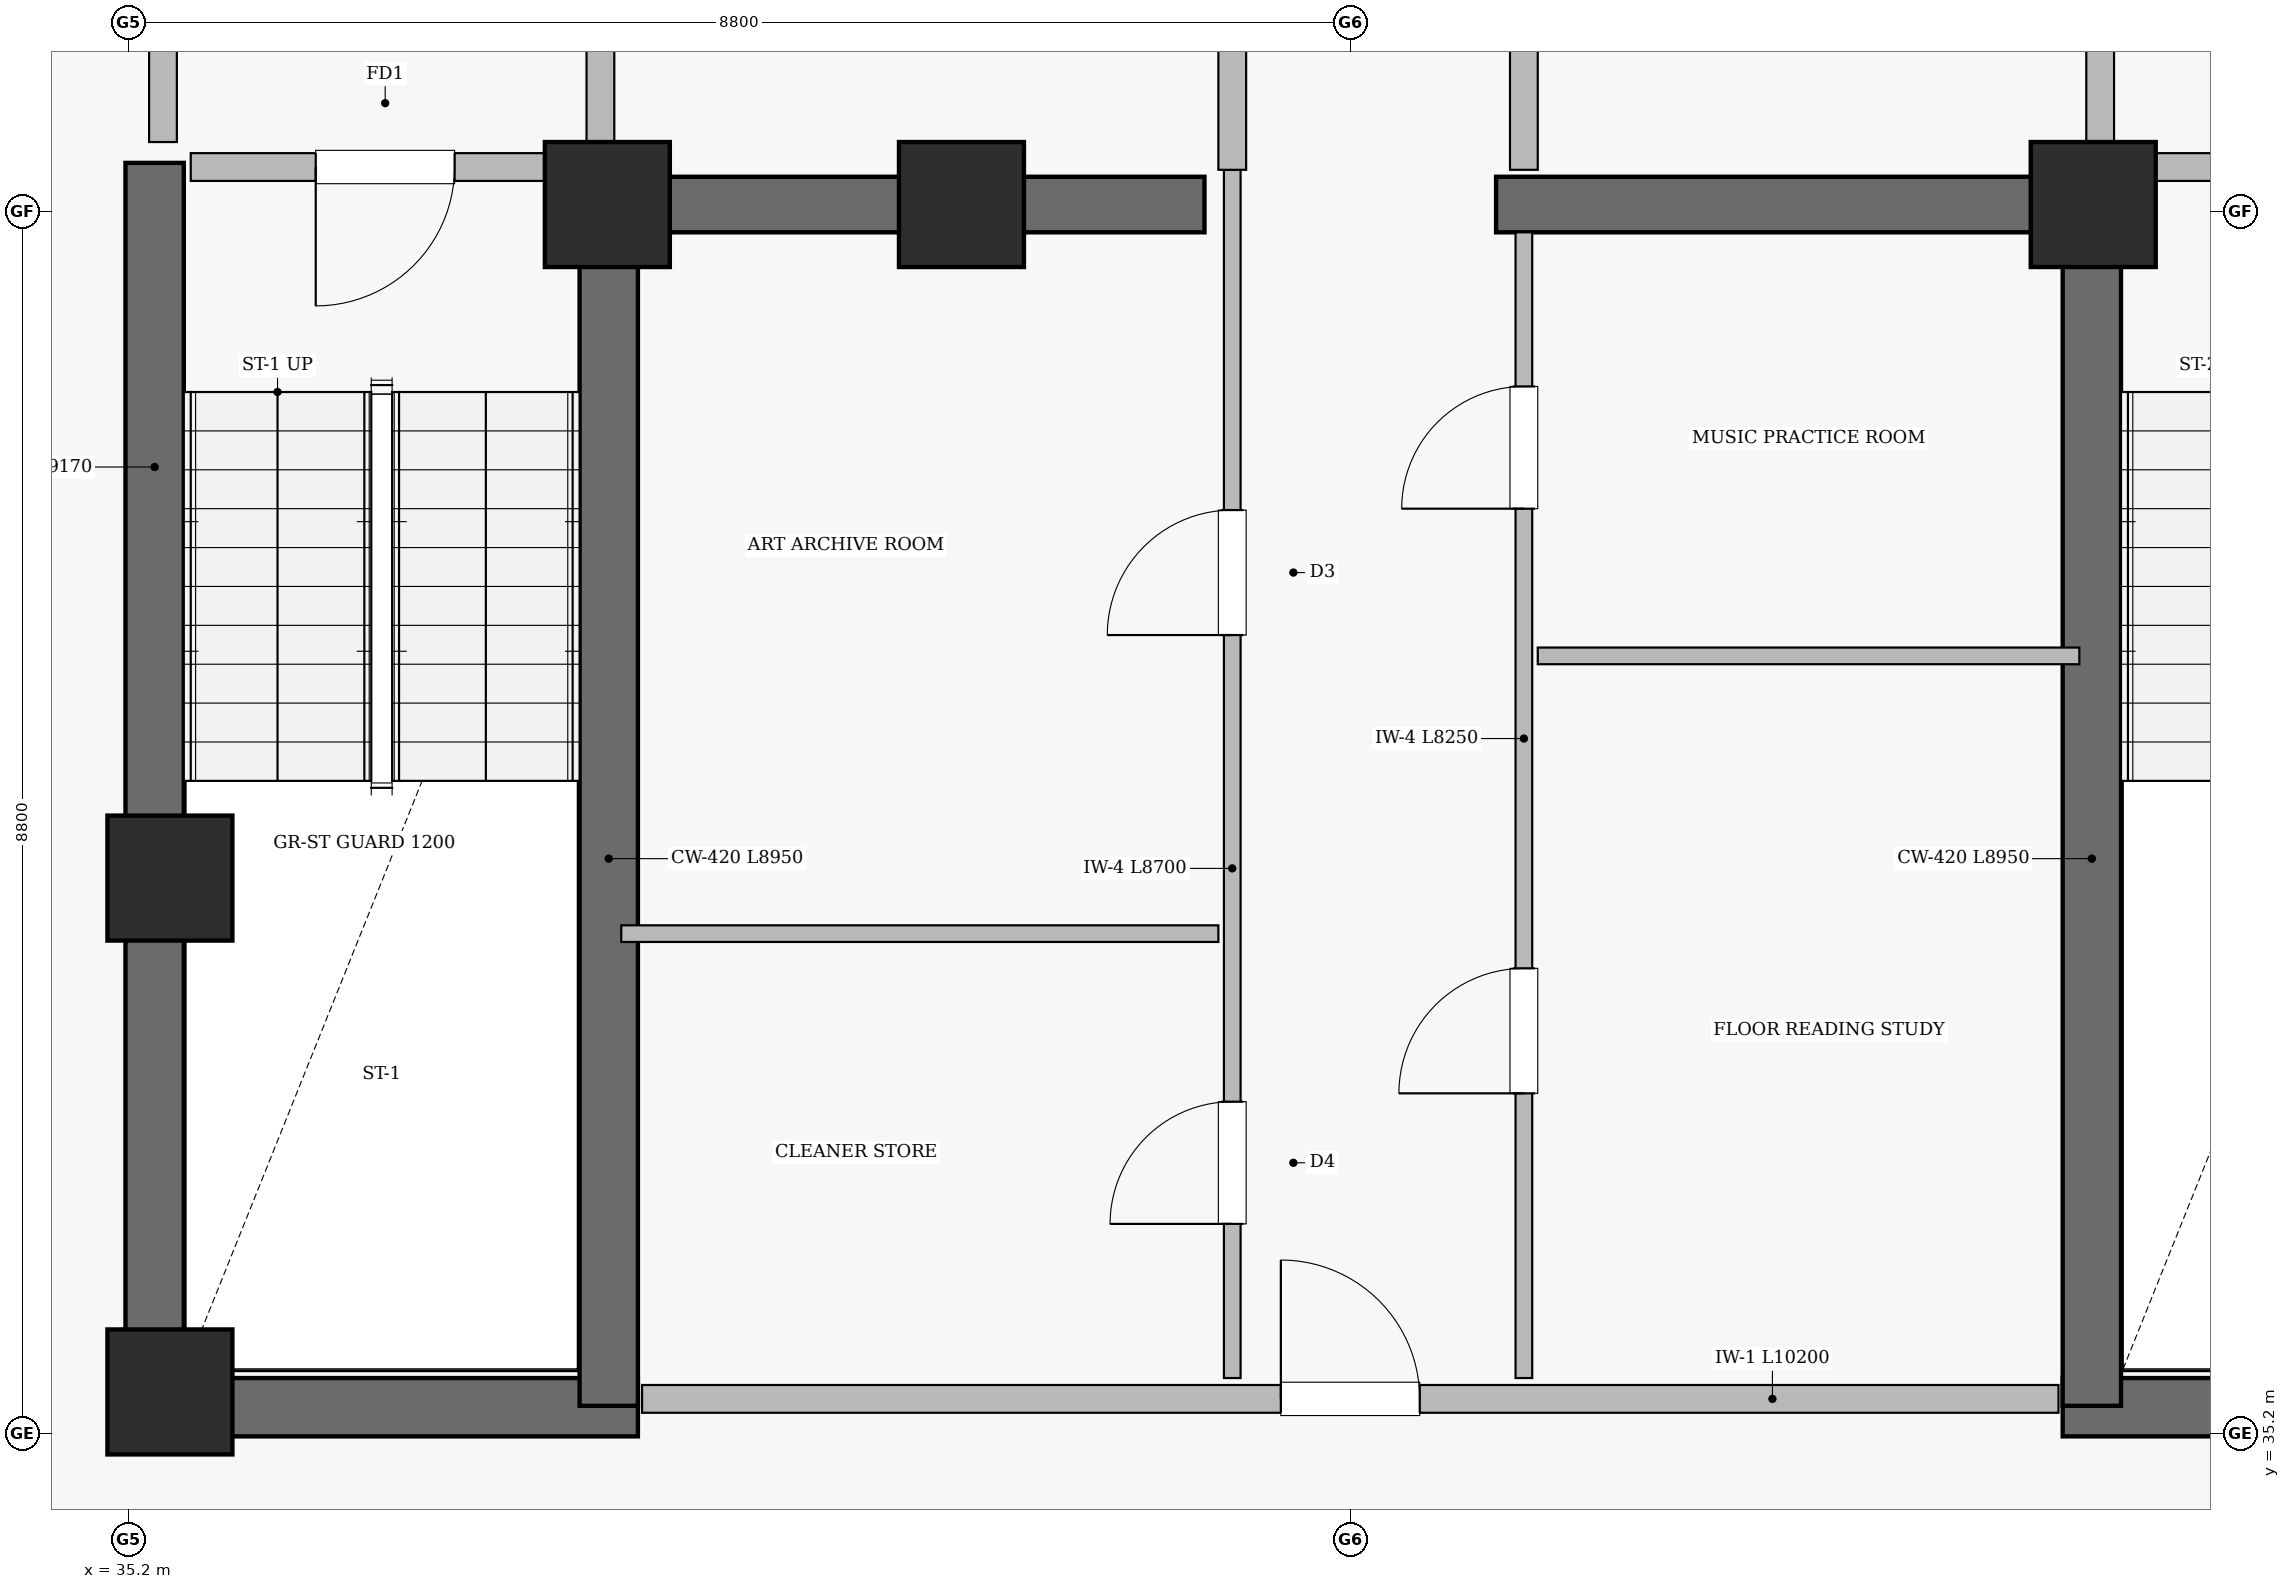
"""IFC4 building model, lengths in metres.
Left out: names, types, materials, properties, quantities, classifications, styles, units other than length and angle.
Written with IfcOpenShell. Run it as: python <this file> out.ifc"""

import sys

from ifc_helpers import new_model, si_unit, direction, frame, frame_2d, origin, origin_2d, place, context, subcontext, project, spatial, rectangle, extrude, element, fill, save


model = new_model("IFC4")
c1 = context("Model", 3, precision=1e-05, world=origin(), true_north=direction((0.0, 1.0)))
c2 = subcontext(c1, "Body", "Model", "MODEL_VIEW")
j1 = project(units=[si_unit("LENGTHUNIT", "METRE"), si_unit("PLANEANGLEUNIT", "RADIAN")], contexts=[c1])
p1 = place(None, origin())
s1 = spatial("IfcSite", under=j1, at=p1, CompositionType="ELEMENT")
p2 = place(p1, origin())
s2 = spatial("IfcBuilding", under=s1, at=p2, CompositionType="ELEMENT")
p3 = place(p2, frame((0.0, 0.0, 263.55)))
s3 = spatial("IfcBuildingStorey", under=s2, at=p3, CompositionType="ELEMENT", Elevation=263.55)
for number, where, z_axis, x_axis in (
    (1, (35.18, 35.39, 0.0), (0.0, 0.0, 1.0), (1.0, 0.0, 0.0)),
    (2, (49.13, 35.39, 0.0), (0.0, 0.0, 1.0), (1.0, 0.0, 0.0)),
):
    element("IfcWall", number, at=place(p3, frame(where, z_axis=z_axis, x_axis=x_axis)), inside=s3, PredefinedType="SHEAR", context=c2, shape_type="SweptSolid", body=[
        extrude(rectangle(XDim=3.69, YDim=0.42, at=frame_2d((1.845, 0.0))), origin(), (0.0, 0.0, 1.0), 3.565),
    ])
p4 = place(p3, frame((35.39, 35.18, 0.0), z_axis=(0.0, 0.0, 1.0), x_axis=(0.0, 1.0, 0.0)))
e3 = element("IfcWall", 3, at=p4, inside=s3, PredefinedType="SHEAR", context=c2, shape_type="SweptSolid", body=[
    extrude(rectangle(XDim=9.17, YDim=0.42, at=frame_2d((4.585, 0.0))), origin(), (0.0, 0.0, 1.0), 3.565),
])
for number, where, z_axis, x_axis in (
    (4, (38.66, 35.4, 0.0), (0.0, 0.0, 1.0), (0.0, 1.0, 0.0)),
    (5, (49.34, 35.4, 0.0), (0.0, 0.0, 1.0), (0.0, 1.0, 0.0)),
):
    element("IfcWall", number, at=place(p3, frame(where, z_axis=z_axis, x_axis=x_axis)), inside=s3, PredefinedType="SHEAR", context=c2, shape_type="SweptSolid", body=[
        extrude(rectangle(XDim=8.95, YDim=0.42, at=frame_2d((4.475, 0.0))), origin(), (0.0, 0.0, 1.0), 3.565),
    ])
for number, where, z_axis, x_axis in (
    (6, (38.75, 44.05, 0.0), (0.0, 0.0, 1.0), (1.0, 0.0, 0.0)),
    (7, (45.05, 44.05, 0.0), (0.0, 0.0, 1.0), (1.0, 0.0, 0.0)),
):
    element("IfcWall", number, at=place(p3, frame(where, z_axis=z_axis, x_axis=x_axis)), inside=s3, PredefinedType="SHEAR", context=c2, shape_type="SweptSolid", body=[
        extrude(rectangle(XDim=4.2, YDim=0.4, at=frame_2d((2.1, 0.0))), origin(), (0.0, 0.0, 1.0), 3.565),
    ])
for number, where, z_axis, x_axis in (
    (8, (35.5, 35.5, 0.0), (0.0, 0.0, 1.0), (1.0, 0.0, 0.0)),
    (9, (38.65, 44.05, 0.0), (0.0, 0.0, 1.0), (1.0, 0.0, 0.0)),
    (10, (49.35, 44.05, 0.0), (0.0, 0.0, 1.0), (1.0, 0.0, 0.0)),
    (11, (35.5, 39.2, 0.0), (0.0, 0.0, 1.0), (1.0, 0.0, 0.0)),
    (12, (41.2, 44.05, 0.0), (0.0, 0.0, 1.0), (1.0, 0.0, 0.0)),
):
    element("IfcColumn", number, at=place(p3, frame(where, z_axis=z_axis, x_axis=x_axis)), inside=s3, PredefinedType="COLUMN", context=c2, shape_type="SweptSolid", body=[
        extrude(rectangle(XDim=0.9, YDim=0.9, at=origin_2d()), origin(), (0.0, 0.0, 1.0), 3.85),
    ])
p5 = place(p3, frame((38.9, 35.45, 0.0), z_axis=(0.0, 0.0, 1.0), x_axis=(1.0, 0.0, 0.0)))
e13 = element("IfcWall", 13, at=p5, inside=s3, PredefinedType="SOLIDWALL", context=c2, shape_type="SweptSolid", body=[
    extrude(rectangle(XDim=10.2, YDim=0.2, at=frame_2d((5.1, 0.0))), origin(), (0.0, 0.0, 1.0), 3.565),
])
p6 = place(p5, frame((4.6, 0.0, 0.0)))
e14 = element("IfcOpeningElement", 14, at=p6, cuts=e13, PredefinedType="OPENING", context=c2, shape_type="SweptSolid", body=[
    extrude(rectangle(XDim=1.0, YDim=2.15, at=frame_2d((0.5, 1.075))), frame((0.0, 0.11, 0.0), z_axis=(0.0, -1.0, 0.0), x_axis=(1.0, 0.0, 0.0)), (0.0, 0.0, 1.0), 0.22),
])
p7 = place(p3, frame((43.15, 35.6, 0.0), z_axis=(0.0, 0.0, 1.0), x_axis=(0.0, 1.0, 0.0)))
e15 = element("IfcWall", 15, at=p7, inside=s3, PredefinedType="PARTITIONING", context=c2, shape_type="SweptSolid", body=[
    extrude(rectangle(XDim=8.7, YDim=0.12, at=frame_2d((4.35, 0.0))), origin(), (0.0, 0.0, 1.0), 3.565),
])
p8 = place(p7, frame((1.11, 0.0, 0.0)))
e16 = element("IfcOpeningElement", 16, at=p8, cuts=e15, PredefinedType="OPENING", context=c2, shape_type="SweptSolid", body=[
    extrude(rectangle(XDim=0.88, YDim=2.1, at=frame_2d((0.44, 1.05))), frame((0.0, 0.07, 0.0), z_axis=(0.0, -1.0, 0.0), x_axis=(1.0, 0.0, 0.0)), (0.0, 0.0, 1.0), 0.14),
])
p9 = place(p7, frame((5.35, 0.0, 0.0)))
e17 = element("IfcOpeningElement", 17, at=p9, cuts=e15, PredefinedType="OPENING", context=c2, shape_type="SweptSolid", body=[
    extrude(rectangle(XDim=0.9, YDim=2.1, at=frame_2d((0.45, 1.05))), frame((0.0, 0.07, 0.0), z_axis=(0.0, -1.0, 0.0), x_axis=(1.0, 0.0, 0.0)), (0.0, 0.0, 1.0), 0.14),
])
p10 = place(p3, frame((45.25, 35.6, 0.0), z_axis=(0.0, 0.0, 1.0), x_axis=(0.0, 1.0, 0.0)))
e18 = element("IfcWall", 18, at=p10, inside=s3, PredefinedType="PARTITIONING", context=c2, shape_type="SweptSolid", body=[
    extrude(rectangle(XDim=8.25, YDim=0.12, at=frame_2d((4.125, 0.0))), origin(), (0.0, 0.0, 1.0), 3.565),
])
p11 = place(p10, frame((2.05, 0.0, 0.0)))
e19 = element("IfcOpeningElement", 19, at=p11, cuts=e18, PredefinedType="OPENING", context=c2, shape_type="SweptSolid", body=[
    extrude(rectangle(XDim=0.9, YDim=2.1, at=frame_2d((0.45, 1.05))), frame((0.0, 0.07, 0.0), z_axis=(0.0, -1.0, 0.0), x_axis=(1.0, 0.0, 0.0)), (0.0, 0.0, 1.0), 0.14),
])
p12 = place(p10, frame((6.26, 0.0, 0.0)))
e20 = element("IfcOpeningElement", 20, at=p12, cuts=e18, PredefinedType="OPENING", context=c2, shape_type="SweptSolid", body=[
    extrude(rectangle(XDim=0.88, YDim=2.1, at=frame_2d((0.44, 1.05))), frame((0.0, 0.07, 0.0), z_axis=(0.0, -1.0, 0.0), x_axis=(1.0, 0.0, 0.0)), (0.0, 0.0, 1.0), 0.14),
])
p13 = place(p3, frame((35.45, 44.5, 0.0), z_axis=(0.0, 0.0, 1.0), x_axis=(0.0, 1.0, 0.0)))
e21 = element("IfcWall", 21, at=p13, inside=s3, PredefinedType="SOLIDWALL", context=c2, shape_type="SweptSolid", body=[
    extrude(rectangle(XDim=7.92, YDim=0.2, at=frame_2d((3.96, 0.0))), origin(), (0.0, 0.0, 1.0), 3.565),
])
p14 = place(p13, frame((2.6, 0.0, 0.0)))
e22 = element("IfcOpeningElement", 22, at=p14, cuts=e21, PredefinedType="OPENING", context=c2, shape_type="SweptSolid", body=[
    extrude(rectangle(XDim=1.0, YDim=2.15, at=frame_2d((0.5, 1.075))), frame((0.0, 0.11, 0.0), z_axis=(0.0, -1.0, 0.0), x_axis=(1.0, 0.0, 0.0)), (0.0, 0.0, 1.0), 0.22),
])
p15 = place(p3, frame((38.6, 44.5, 0.0), z_axis=(0.0, 0.0, 1.0), x_axis=(0.0, 1.0, 0.0)))
e23 = element("IfcWall", 23, at=p15, inside=s3, PredefinedType="SOLIDWALL", context=c2, shape_type="SweptSolid", body=[
    extrude(rectangle(XDim=7.92, YDim=0.2, at=frame_2d((3.96, 0.0))), origin(), (0.0, 0.0, 1.0), 3.565),
])
p16 = place(p15, frame((3.425, 0.0, 0.0)))
e24 = element("IfcOpeningElement", 24, at=p16, cuts=e23, PredefinedType="OPENING", context=c2, shape_type="SweptSolid", body=[
    extrude(rectangle(XDim=0.95, YDim=2.15, at=frame_2d((0.475, 1.075))), frame((0.0, 0.11, 0.0), z_axis=(0.0, -1.0, 0.0), x_axis=(1.0, 0.0, 0.0)), (0.0, 0.0, 1.0), 0.22),
])
p17 = place(p3, frame((49.4, 44.5, 0.0), z_axis=(0.0, 0.0, 1.0), x_axis=(0.0, 1.0, 0.0)))
e25 = element("IfcWall", 25, at=p17, inside=s3, PredefinedType="SOLIDWALL", context=c2, shape_type="SweptSolid", body=[
    extrude(rectangle(XDim=7.92, YDim=0.2, at=frame_2d((3.96, 0.0))), origin(), (0.0, 0.0, 1.0), 3.565),
])
p18 = place(p17, frame((3.425, 0.0, 0.0)))
e26 = element("IfcOpeningElement", 26, at=p18, cuts=e25, PredefinedType="OPENING", context=c2, shape_type="SweptSolid", body=[
    extrude(rectangle(XDim=0.95, YDim=2.15, at=frame_2d((0.475, 1.075))), frame((0.0, 0.11, 0.0), z_axis=(0.0, -1.0, 0.0), x_axis=(1.0, 0.0, 0.0)), (0.0, 0.0, 1.0), 0.22),
])
p19 = place(p3, frame((35.65, 44.32, 0.0), z_axis=(0.0, 0.0, 1.0), x_axis=(1.0, 0.0, 0.0)))
e27 = element("IfcWall", 27, at=p19, inside=s3, PredefinedType="SOLIDWALL", context=c2, shape_type="SweptSolid", body=[
    extrude(rectangle(XDim=2.8, YDim=0.2, at=frame_2d((1.4, 0.0))), origin(), (0.0, 0.0, 1.0), 3.565),
])
p20 = place(p19, frame((0.9, 0.0, 0.0)))
e28 = element("IfcOpeningElement", 28, at=p20, cuts=e27, PredefinedType="OPENING", context=c2, shape_type="SweptSolid", body=[
    extrude(rectangle(XDim=1.0, YDim=2.15, at=frame_2d((0.5, 1.075))), frame((0.0, 0.11, 0.0), z_axis=(0.0, -1.0, 0.0), x_axis=(1.0, 0.0, 0.0)), (0.0, 0.0, 1.0), 0.22),
])
p21 = place(p3, frame((49.55, 44.32, 0.0), z_axis=(0.0, 0.0, 1.0), x_axis=(1.0, 0.0, 0.0)))
e29 = element("IfcWall", 29, at=p21, inside=s3, PredefinedType="SOLIDWALL", context=c2, shape_type="SweptSolid", body=[
    extrude(rectangle(XDim=2.8, YDim=0.2, at=frame_2d((1.4, 0.0))), origin(), (0.0, 0.0, 1.0), 3.565),
])
p22 = place(p21, frame((0.9, 0.0, 0.0)))
e30 = element("IfcOpeningElement", 30, at=p22, cuts=e29, PredefinedType="OPENING", context=c2, shape_type="SweptSolid", body=[
    extrude(rectangle(XDim=1.0, YDim=2.15, at=frame_2d((0.5, 1.075))), frame((0.0, 0.11, 0.0), z_axis=(0.0, -1.0, 0.0), x_axis=(1.0, 0.0, 0.0)), (0.0, 0.0, 1.0), 0.22),
])
p23 = place(p3, frame((38.75, 38.8, 0.0), z_axis=(0.0, 0.0, 1.0), x_axis=(1.0, 0.0, 0.0)))
e31 = element("IfcWall", 31, at=p23, inside=s3, PredefinedType="PARTITIONING", context=c2, shape_type="SweptSolid", body=[
    extrude(rectangle(XDim=4.3, YDim=0.12, at=frame_2d((2.15, 0.0))), origin(), (0.0, 0.0, 1.0), 3.565),
])
p24 = place(p3, frame((45.35, 40.8, 0.0), z_axis=(0.0, 0.0, 1.0), x_axis=(1.0, 0.0, 0.0)))
e32 = element("IfcWall", 32, at=p24, inside=s3, PredefinedType="PARTITIONING", context=c2, shape_type="SweptSolid", body=[
    extrude(rectangle(XDim=3.9, YDim=0.12, at=frame_2d((1.95, 0.0))), origin(), (0.0, 0.0, 1.0), 3.565),
])
for number, where, z_axis, x_axis in (
    (33, (43.15, 44.3, 0.0), (0.0, 0.0, 1.0), (0.0, 1.0, 0.0)),
    (34, (45.25, 44.3, 0.0), (0.0, 0.0, 1.0), (0.0, 1.0, 0.0)),
):
    element("IfcWall", number, at=place(p3, frame(where, z_axis=z_axis, x_axis=x_axis)), inside=s3, PredefinedType="SOLIDWALL", context=c2, shape_type="SweptSolid", body=[
        extrude(rectangle(XDim=2.58, YDim=0.2, at=frame_2d((1.29, 0.0))), origin(), (0.0, 0.0, 1.0), 3.565),
    ])
p25 = place(p20, frame((1.0, 0.0, 0.0), z_axis=(0.0, 0.0, 1.0), x_axis=(-1.0, 0.0, 0.0)))
e35 = element("IfcDoor", 35, at=p25, inside=s3, OperationType="SINGLE_SWING_LEFT", PredefinedType="DOOR", context=c2, shape_type="SweptSolid", body=[
    extrude(rectangle(XDim=1.0, YDim=2.15, at=frame_2d((0.5, 1.075))), frame((0.0, 0.025, 0.0), z_axis=(0.0, -1.0, 0.0), x_axis=(1.0, 0.0, 0.0)), (0.0, 0.0, 1.0), 0.05),
])
fill(e28, e35)
p26 = place(p6, origin())
e36 = element("IfcDoor", 36, at=p26, inside=s3, OperationType="SINGLE_SWING_LEFT", PredefinedType="DOOR", context=c2, shape_type="SweptSolid", body=[
    extrude(rectangle(XDim=1.0, YDim=2.15, at=frame_2d((0.5, 1.075))), frame((0.0, 0.025, 0.0), z_axis=(0.0, -1.0, 0.0), x_axis=(1.0, 0.0, 0.0)), (0.0, 0.0, 1.0), 0.05),
])
fill(e14, e36)
p27 = place(p8, origin())
e37 = element("IfcDoor", 37, at=p27, inside=s3, OperationType="SINGLE_SWING_LEFT", PredefinedType="DOOR", context=c2, shape_type="SweptSolid", body=[
    extrude(rectangle(XDim=0.88, YDim=2.1, at=frame_2d((0.44, 1.05))), frame((0.0, 0.025, 0.0), z_axis=(0.0, -1.0, 0.0), x_axis=(1.0, 0.0, 0.0)), (0.0, 0.0, 1.0), 0.05),
])
fill(e16, e37)
p28 = place(p9, origin())
e38 = element("IfcDoor", 38, at=p28, inside=s3, OperationType="SINGLE_SWING_LEFT", PredefinedType="DOOR", context=c2, shape_type="SweptSolid", body=[
    extrude(rectangle(XDim=0.9, YDim=2.1, at=frame_2d((0.45, 1.05))), frame((0.0, 0.025, 0.0), z_axis=(0.0, -1.0, 0.0), x_axis=(1.0, 0.0, 0.0)), (0.0, 0.0, 1.0), 0.05),
])
fill(e17, e38)
p29 = place(p11, origin())
e39 = element("IfcDoor", 39, at=p29, inside=s3, OperationType="SINGLE_SWING_LEFT", PredefinedType="DOOR", context=c2, shape_type="SweptSolid", body=[
    extrude(rectangle(XDim=0.9, YDim=2.1, at=frame_2d((0.45, 1.05))), frame((0.0, 0.025, 0.0), z_axis=(0.0, -1.0, 0.0), x_axis=(1.0, 0.0, 0.0)), (0.0, 0.0, 1.0), 0.05),
])
fill(e19, e39)
p30 = place(p12, origin())
e40 = element("IfcDoor", 40, at=p30, inside=s3, OperationType="SINGLE_SWING_LEFT", PredefinedType="DOOR", context=c2, shape_type="SweptSolid", body=[
    extrude(rectangle(XDim=0.88, YDim=2.1, at=frame_2d((0.44, 1.05))), frame((0.0, 0.025, 0.0), z_axis=(0.0, -1.0, 0.0), x_axis=(1.0, 0.0, 0.0)), (0.0, 0.0, 1.0), 0.05),
])
fill(e20, e40)
save(model, sys.argv[1])
